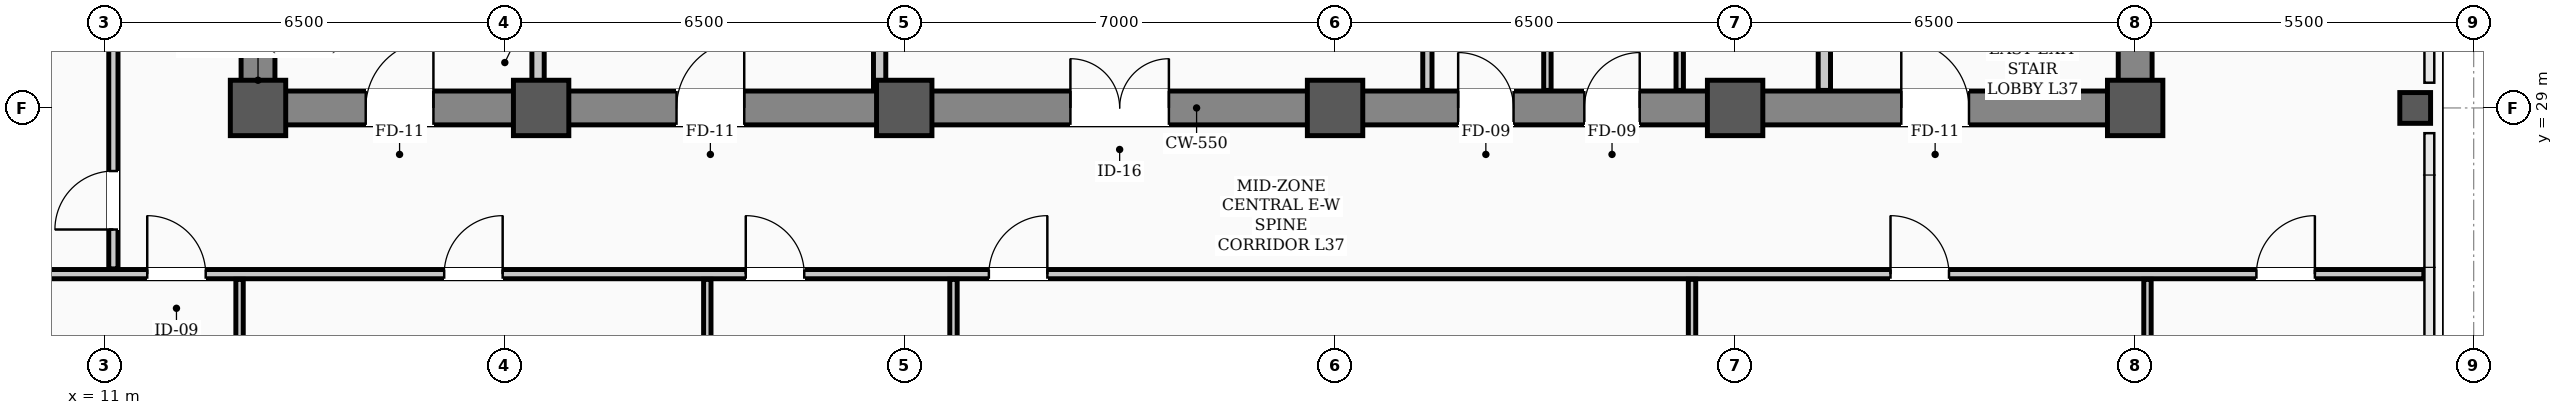
"""IFC4 building model, lengths in metres.
Left out: names, types, materials, properties, quantities, classifications, styles, units other than length and angle.
Written with IfcOpenShell. Run it as: python <this file> out.ifc"""

import sys

from ifc_helpers import new_model, si_unit, direction, frame, frame_2d, origin, origin_2d, place, context, subcontext, project, spatial, rectangle, hollow_rectangle, extrude, element, fill, save


model = new_model("IFC4")
c1 = context("Model", 3, precision=1e-05, world=origin(), true_north=direction((0.0, 1.0)))
c2 = subcontext(c1, "Body", "Model", "MODEL_VIEW")
j1 = project(units=[si_unit("LENGTHUNIT", "METRE"), si_unit("PLANEANGLEUNIT", "RADIAN")], contexts=[c1])
p1 = place(None, origin())
s1 = spatial("IfcSite", under=j1, at=p1, CompositionType="ELEMENT")
p2 = place(p1, origin())
s2 = spatial("IfcBuilding", under=s1, at=p2, CompositionType="ELEMENT")
p3 = place(p2, frame((0.0, 0.0, 150.0)))
s3 = spatial("IfcBuildingStorey", under=s2, at=p3, CompositionType="ELEMENT", Elevation=150.0)
for number, where, z_axis, x_axis in (
    (1, (13.5, 29.0, 0.0), (0.0, 0.0, 1.0), (1.0, 0.0, 0.0)),
    (2, (18.1, 29.0, 0.0), (0.0, 0.0, 1.0), (1.0, 0.0, 0.0)),
    (3, (24.0, 29.0, 0.0), (0.0, 0.0, 1.0), (1.0, 0.0, 0.0)),
    (4, (31.0, 29.0, 0.0), (0.0, 0.0, 1.0), (1.0, 0.0, 0.0)),
    (5, (37.5, 29.0, 0.0), (0.0, 0.0, 1.0), (1.0, 0.0, 0.0)),
    (6, (44.0, 29.0, 0.0), (0.0, 0.0, 1.0), (1.0, 0.0, 0.0)),
):
    element("IfcColumn", number, at=place(p3, frame(where, z_axis=z_axis, x_axis=x_axis)), inside=s3, PredefinedType="COLUMN", context=c2, shape_type="SweptSolid", body=[
        extrude(hollow_rectangle(XDim=0.9, YDim=0.9, WallThickness=0.035, InnerFilletRadius=0.017, OuterFilletRadius=0.052, at=origin_2d()), origin(), (0.0, 0.0, 1.0), 3.9),
    ])
p4 = place(p3, frame((48.55, 29.0, 0.0), z_axis=(0.0, 0.0, 1.0), x_axis=(1.0, 0.0, 0.0)))
e7 = element("IfcColumn", 7, at=p4, inside=s3, PredefinedType="COLUMN", context=c2, shape_type="SweptSolid", body=[
    extrude(hollow_rectangle(XDim=0.5, YDim=0.5, WallThickness=0.024, InnerFilletRadius=0.012, OuterFilletRadius=0.036, at=origin_2d()), origin(), (0.0, 0.0, 1.0), 3.9),
])
p5 = place(p3, frame((13.5, 29.0, 0.0), z_axis=(0.0, 0.0, 1.0), x_axis=(1.0, 0.0, 0.0)))
e8 = element("IfcWall", 8, at=p5, inside=s3, PredefinedType="SHEAR", context=c2, shape_type="SweptSolid", body=[
    extrude(rectangle(XDim=30.5, YDim=0.55, at=frame_2d((15.25, 0.0))), origin(), (0.0, 0.0, 1.0), 3.72),
])
p6 = place(p5, frame((1.75, 0.0, 0.0)))
e9 = element("IfcOpeningElement", 9, at=p6, cuts=e8, PredefinedType="OPENING", context=c2, shape_type="SweptSolid", body=[
    extrude(rectangle(XDim=1.1, YDim=2.08, at=frame_2d((0.55, 1.04))), frame((0.0, 0.285, 0.0), z_axis=(0.0, -1.0, 0.0), x_axis=(1.0, 0.0, 0.0)), (0.0, 0.0, 1.0), 0.57),
])
p7 = place(p5, frame((26.7, 0.0, 0.0)))
e10 = element("IfcOpeningElement", 10, at=p7, cuts=e8, PredefinedType="OPENING", context=c2, shape_type="SweptSolid", body=[
    extrude(rectangle(XDim=1.1, YDim=2.08, at=frame_2d((0.55, 1.04))), frame((0.0, 0.285, 0.0), z_axis=(0.0, -1.0, 0.0), x_axis=(1.0, 0.0, 0.0)), (0.0, 0.0, 1.0), 0.57),
])
p8 = place(p5, frame((6.8, 0.0, 0.0)))
e11 = element("IfcOpeningElement", 11, at=p8, cuts=e8, PredefinedType="OPENING", context=c2, shape_type="SweptSolid", body=[
    extrude(rectangle(XDim=1.1, YDim=2.08, at=frame_2d((0.55, 1.04))), frame((0.0, 0.285, 0.0), z_axis=(0.0, -1.0, 0.0), x_axis=(1.0, 0.0, 0.0)), (0.0, 0.0, 1.0), 0.57),
])
p9 = place(p5, frame((13.2, 0.0, 0.0)))
e12 = element("IfcOpeningElement", 12, at=p9, cuts=e8, PredefinedType="OPENING", context=c2, shape_type="SweptSolid", body=[
    extrude(rectangle(XDim=1.6, YDim=2.08, at=frame_2d((0.8, 1.04))), frame((0.0, 0.285, 0.0), z_axis=(0.0, -1.0, 0.0), x_axis=(1.0, 0.0, 0.0)), (0.0, 0.0, 1.0), 0.57),
])
p10 = place(p5, frame((19.5, 0.0, 0.0)))
e13 = element("IfcOpeningElement", 13, at=p10, cuts=e8, PredefinedType="OPENING", context=c2, shape_type="SweptSolid", body=[
    extrude(rectangle(XDim=0.9, YDim=2.08, at=frame_2d((0.45, 1.04))), frame((0.0, 0.285, 0.0), z_axis=(0.0, -1.0, 0.0), x_axis=(1.0, 0.0, 0.0)), (0.0, 0.0, 1.0), 0.57),
])
p11 = place(p5, frame((21.55, 0.0, 0.0)))
e14 = element("IfcOpeningElement", 14, at=p11, cuts=e8, PredefinedType="OPENING", context=c2, shape_type="SweptSolid", body=[
    extrude(rectangle(XDim=0.9, YDim=2.08, at=frame_2d((0.45, 1.04))), frame((0.0, 0.285, 0.0), z_axis=(0.0, -1.0, 0.0), x_axis=(1.0, 0.0, 0.0)), (0.0, 0.0, 1.0), 0.57),
])
for number, where, z_axis, x_axis in (
    (15, (13.5, 29.35, 0.0), (0.0, 0.0, 1.0), (0.0, 1.0, 0.0)),
    (16, (44.0, 29.35, 0.0), (0.0, 0.0, 1.0), (0.0, 1.0, 0.0)),
):
    element("IfcWall", number, at=place(p3, frame(where, z_axis=z_axis, x_axis=x_axis)), inside=s3, PredefinedType="SHEAR", context=c2, shape_type="SweptSolid", body=[
        extrude(rectangle(XDim=8.6, YDim=0.55, at=frame_2d((4.3, 0.0))), origin(), (0.0, 0.0, 1.0), 3.72),
    ])
p12 = place(p3, frame((2.31, 26.3, 0.0), z_axis=(0.0, 0.0, 1.0), x_axis=(1.0, 0.0, 0.0)))
e17 = element("IfcWall", 17, at=p12, inside=s3, PredefinedType="PARTITIONING", context=c2, shape_type="SweptSolid", body=[
    extrude(rectangle(XDim=46.38, YDim=0.15, at=frame_2d((23.19, 0.0))), origin(), (0.0, 0.0, 1.0), 3.2),
])
p13 = place(p12, frame((9.39, 0.0, 0.0)))
e18 = element("IfcOpeningElement", 18, at=p13, cuts=e17, PredefinedType="OPENING", context=c2, shape_type="SweptSolid", body=[
    extrude(rectangle(XDim=0.95, YDim=2.08, at=frame_2d((0.475, 1.04))), frame((0.0, 0.085, 0.0), z_axis=(0.0, -1.0, 0.0), x_axis=(1.0, 0.0, 0.0)), (0.0, 0.0, 1.0), 0.17),
])
p14 = place(p12, frame((14.215, 0.0, 0.0)))
e19 = element("IfcOpeningElement", 19, at=p14, cuts=e17, PredefinedType="OPENING", context=c2, shape_type="SweptSolid", body=[
    extrude(rectangle(XDim=0.95, YDim=2.08, at=frame_2d((0.475, 1.04))), frame((0.0, 0.085, 0.0), z_axis=(0.0, -1.0, 0.0), x_axis=(1.0, 0.0, 0.0)), (0.0, 0.0, 1.0), 0.17),
])
p15 = place(p12, frame((19.115, 0.0, 0.0)))
e20 = element("IfcOpeningElement", 20, at=p15, cuts=e17, PredefinedType="OPENING", context=c2, shape_type="SweptSolid", body=[
    extrude(rectangle(XDim=0.95, YDim=2.08, at=frame_2d((0.475, 1.04))), frame((0.0, 0.085, 0.0), z_axis=(0.0, -1.0, 0.0), x_axis=(1.0, 0.0, 0.0)), (0.0, 0.0, 1.0), 0.17),
])
p16 = place(p12, frame((23.065, 0.0, 0.0)))
e21 = element("IfcOpeningElement", 21, at=p16, cuts=e17, PredefinedType="OPENING", context=c2, shape_type="SweptSolid", body=[
    extrude(rectangle(XDim=0.95, YDim=2.08, at=frame_2d((0.475, 1.04))), frame((0.0, 0.085, 0.0), z_axis=(0.0, -1.0, 0.0), x_axis=(1.0, 0.0, 0.0)), (0.0, 0.0, 1.0), 0.17),
])
p17 = place(p12, frame((37.715, 0.0, 0.0)))
e22 = element("IfcOpeningElement", 22, at=p17, cuts=e17, PredefinedType="OPENING", context=c2, shape_type="SweptSolid", body=[
    extrude(rectangle(XDim=0.95, YDim=2.08, at=frame_2d((0.475, 1.04))), frame((0.0, 0.085, 0.0), z_axis=(0.0, -1.0, 0.0), x_axis=(1.0, 0.0, 0.0)), (0.0, 0.0, 1.0), 0.17),
])
p18 = place(p12, frame((43.66, 0.0, 0.0)))
e23 = element("IfcOpeningElement", 23, at=p18, cuts=e17, PredefinedType="OPENING", context=c2, shape_type="SweptSolid", body=[
    extrude(rectangle(XDim=0.95, YDim=2.08, at=frame_2d((0.475, 1.04))), frame((0.0, 0.085, 0.0), z_axis=(0.0, -1.0, 0.0), x_axis=(1.0, 0.0, 0.0)), (0.0, 0.0, 1.0), 0.17),
])
for number, where, z_axis, x_axis in (
    (24, (18.05, 29.285, 0.0), (0.0, 0.0, 1.0), (0.0, 1.0, 0.0)),
    (25, (38.95, 29.285, 0.0), (0.0, 0.0, 1.0), (0.0, 1.0, 0.0)),
):
    element("IfcWall", number, at=place(p3, frame(where, z_axis=z_axis, x_axis=x_axis)), inside=s3, PredefinedType="STANDARD", context=c2, shape_type="SweptSolid", body=[
        extrude(rectangle(XDim=1.015, YDim=0.2, at=frame_2d((0.508, 0.0))), origin(), (0.0, 0.0, 1.0), 3.35),
    ])
p19 = place(p3, frame((23.6, 29.285, 0.0), z_axis=(0.0, 0.0, 1.0), x_axis=(0.0, 1.0, 0.0)))
e26 = element("IfcWall", 26, at=p19, inside=s3, PredefinedType="STANDARD", context=c2, shape_type="SweptSolid", body=[
    extrude(rectangle(XDim=5.415, YDim=0.2, at=frame_2d((2.708, 0.0))), origin(), (0.0, 0.0, 1.0), 3.2),
])
p20 = place(p3, frame((32.5, 29.285, 0.0), z_axis=(0.0, 0.0, 1.0), x_axis=(0.0, 1.0, 0.0)))
e27 = element("IfcWall", 27, at=p20, inside=s3, PredefinedType="PARTITIONING", context=c2, shape_type="SweptSolid", body=[
    extrude(rectangle(XDim=2.48, YDim=0.15, at=frame_2d((1.24, 0.0))), origin(), (0.0, 0.0, 1.0), 3.35),
])
for number, where, z_axis, x_axis in (
    (28, (36.6, 29.285, 0.0), (0.0, 0.0, 1.0), (0.0, 1.0, 0.0)),
    (29, (34.45, 29.285, 0.0), (0.0, 0.0, 1.0), (0.0, 1.0, 0.0)),
):
    element("IfcWall", number, at=place(p3, frame(where, z_axis=z_axis, x_axis=x_axis)), inside=s3, PredefinedType="PARTITIONING", context=c2, shape_type="SweptSolid", body=[
        extrude(rectangle(XDim=2.48, YDim=0.12, at=frame_2d((1.24, 0.0))), origin(), (0.0, 0.0, 1.0), 3.35),
    ])
p21 = place(p3, frame((11.15, 26.385, 0.0), z_axis=(0.0, 0.0, 1.0), x_axis=(0.0, 1.0, 0.0)))
e30 = element("IfcWall", 30, at=p21, inside=s3, PredefinedType="PARTITIONING", context=c2, shape_type="SweptSolid", body=[
    extrude(rectangle(XDim=13.58, YDim=0.15, at=frame_2d((6.79, 0.0))), origin(), (0.0, 0.0, 1.0), 3.1),
])
p22 = place(p21, frame((0.64, 0.0, 0.0)))
e31 = element("IfcOpeningElement", 31, at=p22, cuts=e30, PredefinedType="OPENING", context=c2, shape_type="SweptSolid", body=[
    extrude(rectangle(XDim=0.95, YDim=2.08, at=frame_2d((0.475, 1.04))), frame((0.0, 0.085, 0.0), z_axis=(0.0, -1.0, 0.0), x_axis=(1.0, 0.0, 0.0)), (0.0, 0.0, 1.0), 0.17),
])
p23 = place(p21, frame((6.94, 0.0, 0.0)))
e32 = element("IfcOpeningElement", 32, at=p23, cuts=e30, PredefinedType="OPENING", context=c2, shape_type="SweptSolid", body=[
    extrude(rectangle(XDim=0.95, YDim=2.08, at=frame_2d((0.475, 1.04))), frame((0.0, 0.085, 0.0), z_axis=(0.0, -1.0, 0.0), x_axis=(1.0, 0.0, 0.0)), (0.0, 0.0, 1.0), 0.17),
])
p24 = place(p21, frame((11.065, 0.0, 0.0)))
e33 = element("IfcOpeningElement", 33, at=p24, cuts=e30, PredefinedType="OPENING", context=c2, shape_type="SweptSolid", body=[
    extrude(rectangle(XDim=0.95, YDim=2.08, at=frame_2d((0.475, 1.04))), frame((0.0, 0.085, 0.0), z_axis=(0.0, -1.0, 0.0), x_axis=(1.0, 0.0, 0.0)), (0.0, 0.0, 1.0), 0.17),
])
for number, where, z_axis, x_axis in (
    (34, (13.2, 16.31, 0.0), (0.0, 0.0, 1.0), (0.0, 1.0, 0.0)),
    (35, (20.8, 16.31, 0.0), (0.0, 0.0, 1.0), (0.0, 1.0, 0.0)),
):
    element("IfcWall", number, at=place(p3, frame(where, z_axis=z_axis, x_axis=x_axis)), inside=s3, PredefinedType="PARTITIONING", context=c2, shape_type="SweptSolid", body=[
        extrude(rectangle(XDim=9.905, YDim=0.12, at=frame_2d((4.953, 0.0))), origin(), (0.0, 0.0, 1.0), 3.1),
    ])
p25 = place(p3, frame((24.8, 18.07, 0.0), z_axis=(0.0, 0.0, 1.0), x_axis=(0.0, 1.0, 0.0)))
e36 = element("IfcWall", 36, at=p25, inside=s3, PredefinedType="PARTITIONING", context=c2, shape_type="SweptSolid", body=[
    extrude(rectangle(XDim=8.145, YDim=0.12, at=frame_2d((4.073, 0.0))), origin(), (0.0, 0.0, 1.0), 3.1),
])
for number, where, z_axis, x_axis in (
    (37, (36.8, 16.31, 0.0), (0.0, 0.0, 1.0), (0.0, 1.0, 0.0)),
    (38, (44.2, 16.31, 0.0), (0.0, 0.0, 1.0), (0.0, 1.0, 0.0)),
):
    element("IfcWall", number, at=place(p3, frame(where, z_axis=z_axis, x_axis=x_axis)), inside=s3, PredefinedType="PARTITIONING", context=c2, shape_type="SweptSolid", body=[
        extrude(rectangle(XDim=9.905, YDim=0.12, at=frame_2d((4.953, 0.0))), origin(), (0.0, 0.0, 1.0), 3.1),
    ])
p26 = place(p6, origin())
e39 = element("IfcDoor", 39, at=p26, inside=s3, OperationType="SINGLE_SWING_RIGHT", PredefinedType="DOOR", context=c2, shape_type="SweptSolid", body=[
    extrude(rectangle(XDim=1.1, YDim=2.08, at=frame_2d((0.55, 1.04))), frame((0.0, 0.025, 0.0), z_axis=(0.0, -1.0, 0.0), x_axis=(1.0, 0.0, 0.0)), (0.0, 0.0, 1.0), 0.05),
])
fill(e9, e39)
p27 = place(p7, origin())
e40 = element("IfcDoor", 40, at=p27, inside=s3, OperationType="SINGLE_SWING_LEFT", PredefinedType="DOOR", context=c2, shape_type="SweptSolid", body=[
    extrude(rectangle(XDim=1.1, YDim=2.08, at=frame_2d((0.55, 1.04))), frame((0.0, 0.025, 0.0), z_axis=(0.0, -1.0, 0.0), x_axis=(1.0, 0.0, 0.0)), (0.0, 0.0, 1.0), 0.05),
])
fill(e10, e40)
p28 = place(p8, origin())
e41 = element("IfcDoor", 41, at=p28, inside=s3, OperationType="SINGLE_SWING_RIGHT", PredefinedType="DOOR", context=c2, shape_type="SweptSolid", body=[
    extrude(rectangle(XDim=1.1, YDim=2.08, at=frame_2d((0.55, 1.04))), frame((0.0, 0.025, 0.0), z_axis=(0.0, -1.0, 0.0), x_axis=(1.0, 0.0, 0.0)), (0.0, 0.0, 1.0), 0.05),
])
fill(e11, e41)
p29 = place(p9, origin())
e42 = element("IfcDoor", 42, at=p29, inside=s3, OperationType="DOUBLE_DOOR_SINGLE_SWING", PredefinedType="DOOR", context=c2, shape_type="SweptSolid", body=[
    extrude(rectangle(XDim=1.6, YDim=2.08, at=frame_2d((0.8, 1.04))), frame((0.0, 0.025, 0.0), z_axis=(0.0, -1.0, 0.0), x_axis=(1.0, 0.0, 0.0)), (0.0, 0.0, 1.0), 0.05),
])
fill(e12, e42)
p30 = place(p10, origin())
e43 = element("IfcDoor", 43, at=p30, inside=s3, OperationType="SINGLE_SWING_LEFT", PredefinedType="DOOR", context=c2, shape_type="SweptSolid", body=[
    extrude(rectangle(XDim=0.9, YDim=2.08, at=frame_2d((0.45, 1.04))), frame((0.0, 0.025, 0.0), z_axis=(0.0, -1.0, 0.0), x_axis=(1.0, 0.0, 0.0)), (0.0, 0.0, 1.0), 0.05),
])
fill(e13, e43)
p31 = place(p11, origin())
e44 = element("IfcDoor", 44, at=p31, inside=s3, OperationType="SINGLE_SWING_RIGHT", PredefinedType="DOOR", context=c2, shape_type="SweptSolid", body=[
    extrude(rectangle(XDim=0.9, YDim=2.08, at=frame_2d((0.45, 1.04))), frame((0.0, 0.025, 0.0), z_axis=(0.0, -1.0, 0.0), x_axis=(1.0, 0.0, 0.0)), (0.0, 0.0, 1.0), 0.05),
])
fill(e14, e44)
p32 = place(p13, origin())
e45 = element("IfcDoor", 45, at=p32, inside=s3, OperationType="SINGLE_SWING_LEFT", PredefinedType="DOOR", context=c2, shape_type="SweptSolid", body=[
    extrude(rectangle(XDim=0.95, YDim=2.08, at=frame_2d((0.475, 1.04))), frame((0.0, 0.025, 0.0), z_axis=(0.0, -1.0, 0.0), x_axis=(1.0, 0.0, 0.0)), (0.0, 0.0, 1.0), 0.05),
])
fill(e18, e45)
p33 = place(p14, origin())
e46 = element("IfcDoor", 46, at=p33, inside=s3, OperationType="SINGLE_SWING_RIGHT", PredefinedType="DOOR", context=c2, shape_type="SweptSolid", body=[
    extrude(rectangle(XDim=0.95, YDim=2.08, at=frame_2d((0.475, 1.04))), frame((0.0, 0.025, 0.0), z_axis=(0.0, -1.0, 0.0), x_axis=(1.0, 0.0, 0.0)), (0.0, 0.0, 1.0), 0.05),
])
fill(e19, e46)
p34 = place(p15, origin())
e47 = element("IfcDoor", 47, at=p34, inside=s3, OperationType="SINGLE_SWING_LEFT", PredefinedType="DOOR", context=c2, shape_type="SweptSolid", body=[
    extrude(rectangle(XDim=0.95, YDim=2.08, at=frame_2d((0.475, 1.04))), frame((0.0, 0.025, 0.0), z_axis=(0.0, -1.0, 0.0), x_axis=(1.0, 0.0, 0.0)), (0.0, 0.0, 1.0), 0.05),
])
fill(e20, e47)
p35 = place(p16, origin())
e48 = element("IfcDoor", 48, at=p35, inside=s3, OperationType="SINGLE_SWING_RIGHT", PredefinedType="DOOR", context=c2, shape_type="SweptSolid", body=[
    extrude(rectangle(XDim=0.95, YDim=2.08, at=frame_2d((0.475, 1.04))), frame((0.0, 0.025, 0.0), z_axis=(0.0, -1.0, 0.0), x_axis=(1.0, 0.0, 0.0)), (0.0, 0.0, 1.0), 0.05),
])
fill(e21, e48)
p36 = place(p17, origin())
e49 = element("IfcDoor", 49, at=p36, inside=s3, OperationType="SINGLE_SWING_LEFT", PredefinedType="DOOR", context=c2, shape_type="SweptSolid", body=[
    extrude(rectangle(XDim=0.95, YDim=2.08, at=frame_2d((0.475, 1.04))), frame((0.0, 0.025, 0.0), z_axis=(0.0, -1.0, 0.0), x_axis=(1.0, 0.0, 0.0)), (0.0, 0.0, 1.0), 0.05),
])
fill(e22, e49)
p37 = place(p18, origin())
e50 = element("IfcDoor", 50, at=p37, inside=s3, OperationType="SINGLE_SWING_RIGHT", PredefinedType="DOOR", context=c2, shape_type="SweptSolid", body=[
    extrude(rectangle(XDim=0.95, YDim=2.08, at=frame_2d((0.475, 1.04))), frame((0.0, 0.025, 0.0), z_axis=(0.0, -1.0, 0.0), x_axis=(1.0, 0.0, 0.0)), (0.0, 0.0, 1.0), 0.05),
])
fill(e23, e50)
p38 = place(p22, origin())
e51 = element("IfcDoor", 51, at=p38, inside=s3, OperationType="SINGLE_SWING_LEFT", PredefinedType="DOOR", context=c2, shape_type="SweptSolid", body=[
    extrude(rectangle(XDim=0.95, YDim=2.08, at=frame_2d((0.475, 1.04))), frame((0.0, 0.025, 0.0), z_axis=(0.0, -1.0, 0.0), x_axis=(1.0, 0.0, 0.0)), (0.0, 0.0, 1.0), 0.05),
])
fill(e31, e51)
save(model, sys.argv[1])
